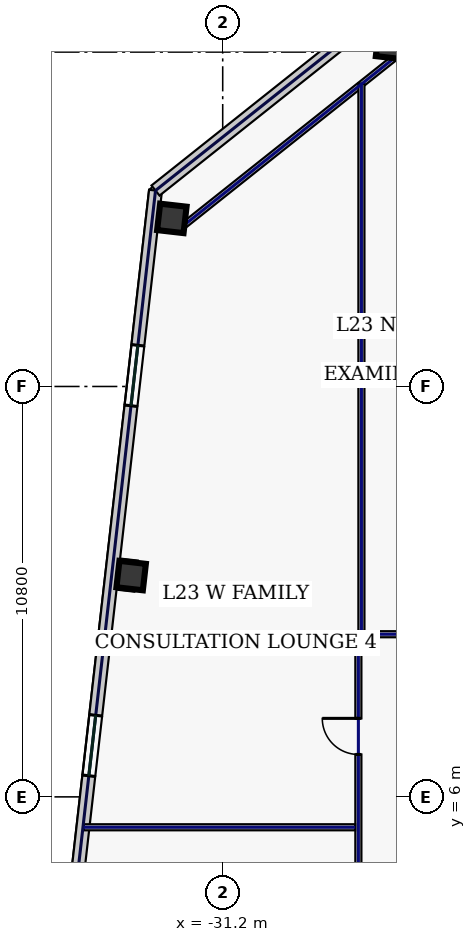
"""IFC4 building model, lengths in metres.
Left out: names, types, materials, properties, quantities, classifications, styles, units other than length and angle.
Written with IfcOpenShell. Run it as: python <this file> out.ifc"""

import sys

from ifc_helpers import new_model, si_unit, direction, frame, frame_2d, origin, origin_2d, place, context, subcontext, project, spatial, rectangle, hollow_rectangle, extrude, element, fill, save


model = new_model("IFC4")
c1 = context("Model", 3, precision=1e-05, world=origin(), true_north=direction((0.0, 1.0)))
c2 = subcontext(c1, "Body", "Model", "MODEL_VIEW")
j1 = project(units=[si_unit("LENGTHUNIT", "METRE"), si_unit("PLANEANGLEUNIT", "RADIAN")], contexts=[c1])
p1 = place(None, origin())
s1 = spatial("IfcSite", under=j1, at=p1, CompositionType="ELEMENT")
p2 = place(p1, origin())
s2 = spatial("IfcBuilding", under=s1, at=p2, CompositionType="ELEMENT")
p3 = place(p2, frame((0.0, 0.0, 105.4)))
s3 = spatial("IfcBuildingStorey", under=s2, at=p3, CompositionType="ELEMENT", Elevation=105.4)
for number, where, z_axis, x_axis in (
    (1, (-26.783, 25.801, 0.0), (0.0, 0.0, 1.0), (0.994, -0.113, 0.0)),
    (2, (-32.538, 21.223, 0.0), (0.0, 0.0, 1.0), (0.994, -0.113, 0.0)),
    (3, (-33.609, 11.824, 0.0), (0.0, 0.0, 1.0), (0.994, -0.113, 0.0)),
):
    element("IfcColumn", number, at=place(p3, frame(where, z_axis=z_axis, x_axis=x_axis)), inside=s3, PredefinedType="COLUMN", context=c2, shape_type="SweptSolid", body=[
        extrude(hollow_rectangle(XDim=0.7, YDim=0.7, WallThickness=0.032, at=origin_2d()), origin(), (0.0, 0.0, 1.0), 3.74),
    ])
p4 = place(p3, frame((-6.314, 23.982, 0.0), z_axis=(0.0, 0.0, 1.0), x_axis=(-0.993571362037, 0.113207546299, 0.0)))
e4 = element("IfcWall", 4, at=p4, inside=s3, PredefinedType="STANDARD", context=c2, shape_type="SweptSolid", body=[
    extrude(rectangle(XDim=21.223, YDim=0.34, at=frame_2d((10.611, 0.0))), origin(), (0.0, 0.0, 1.0), 3.74),
])
p5 = place(p4, frame((17.265, 0.0, 0.22)))
e5 = element("IfcOpeningElement", 5, at=p5, cuts=e4, PredefinedType="OPENING", context=c2, shape_type="SweptSolid", body=[
    extrude(rectangle(XDim=1.6, YDim=1.2, at=frame_2d((0.8, 0.6))), frame((0.0, 0.18, 0.0), z_axis=(0.0, -1.0, 0.0), x_axis=(1.0, 0.0, 0.0)), (0.0, 0.0, 1.0), 0.36),
])
p6 = place(p4, frame((12.794, 0.0, 0.67)))
e6 = element("IfcOpeningElement", 6, at=p6, cuts=e4, PredefinedType="OPENING", context=c2, shape_type="SweptSolid", body=[
    extrude(rectangle(XDim=2.1, YDim=2.2, at=frame_2d((1.05, 1.1))), frame((0.0, 0.18, 0.0), z_axis=(0.0, -1.0, 0.0), x_axis=(1.0, 0.0, 0.0)), (0.0, 0.0, 1.0), 0.36),
])
p7 = place(p4, frame((3.616, 0.0, 0.67)))
e7 = element("IfcOpeningElement", 7, at=p7, cuts=e4, PredefinedType="OPENING", context=c2, shape_type="SweptSolid", body=[
    extrude(rectangle(XDim=2.1, YDim=2.2, at=frame_2d((1.05, 1.1))), frame((0.0, 0.18, 0.0), z_axis=(0.0, -1.0, 0.0), x_axis=(1.0, 0.0, 0.0)), (0.0, 0.0, 1.0), 0.36),
])
p8 = place(p3, frame((-32.968, 21.957, 0.0), z_axis=(0.0, 0.0, 1.0), x_axis=(-0.113201605824, -0.993572038877, 0.0)))
e8 = element("IfcWall", 8, at=p8, inside=s3, PredefinedType="STANDARD", context=c2, shape_type="SweptSolid", body=[
    extrude(rectangle(XDim=39.2, YDim=0.34, at=frame_2d((19.6, 0.0))), origin(), (0.0, 0.0, 1.0), 3.74),
])
p9 = place(p8, frame((4.1, 0.0, 0.58)))
e9 = element("IfcOpeningElement", 9, at=p9, cuts=e8, PredefinedType="OPENING", context=c2, shape_type="SweptSolid", body=[
    extrude(rectangle(XDim=1.6, YDim=2.3, at=frame_2d((0.8, 1.15))), frame((0.0, 0.18, 0.0), z_axis=(0.0, -1.0, 0.0), x_axis=(1.0, 0.0, 0.0)), (0.0, 0.0, 1.0), 0.36),
])
p10 = place(p8, frame((13.9, 0.0, 0.58)))
e10 = element("IfcOpeningElement", 10, at=p10, cuts=e8, PredefinedType="OPENING", context=c2, shape_type="SweptSolid", body=[
    extrude(rectangle(XDim=1.6, YDim=2.3, at=frame_2d((0.8, 1.15))), frame((0.0, 0.18, 0.0), z_axis=(0.0, -1.0, 0.0), x_axis=(1.0, 0.0, 0.0)), (0.0, 0.0, 1.0), 0.36),
])
p11 = place(p8, frame((24.8, 0.0, 0.75)))
e11 = element("IfcOpeningElement", 11, at=p11, cuts=e8, PredefinedType="OPENING", context=c2, shape_type="SweptSolid", body=[
    extrude(rectangle(XDim=0.85, YDim=1.85, at=frame_2d((0.425, 0.925))), frame((0.0, 0.18, 0.0), z_axis=(0.0, -1.0, 0.0), x_axis=(1.0, 0.0, 0.0)), (0.0, 0.0, 1.0), 0.36),
])
p12 = place(p8, frame((33.5, 0.0, 0.58)))
e12 = element("IfcOpeningElement", 12, at=p12, cuts=e8, PredefinedType="OPENING", context=c2, shape_type="SweptSolid", body=[
    extrude(rectangle(XDim=1.6, YDim=2.3, at=frame_2d((0.8, 1.15))), frame((0.0, 0.18, 0.0), z_axis=(0.0, -1.0, 0.0), x_axis=(1.0, 0.0, 0.0)), (0.0, 0.0, 1.0), 0.36),
])
p13 = place(p3, frame((-27.401, 26.385, 0.0), z_axis=(0.0, 0.0, 1.0), x_axis=(-0.78261359446, -0.622507800567, 0.0)))
e13 = element("IfcWall", 13, at=p13, inside=s3, PredefinedType="STANDARD", context=c2, shape_type="SweptSolid", body=[
    extrude(rectangle(XDim=7.114, YDim=0.34, at=frame_2d((3.557, 0.0))), origin(), (0.0, 0.0, 1.0), 3.74),
])
p14 = place(p3, frame((-26.571, 25.535, 0.0), z_axis=(0.0, 0.0, 1.0), x_axis=(-0.782617962887, -0.622502308564, 0.0)))
e14 = element("IfcWall", 14, at=p14, inside=s3, PredefinedType="PARTITIONING", context=c2, shape_type="SweptSolid", body=[
    extrude(rectangle(XDim=7.354, YDim=0.16, at=frame_2d((3.677, 0.0))), origin(), (0.0, 0.0, 1.0), 3.74),
])
p15 = place(p3, frame((-27.63, -10.015, 0.0), z_axis=(0.0, 0.0, 1.0), x_axis=(0.0, 1.0, 0.0)))
e15 = element("IfcWall", 15, at=p15, inside=s3, PredefinedType="PARTITIONING", context=c2, shape_type="SweptSolid", body=[
    extrude(rectangle(XDim=20.13, YDim=0.16, at=frame_2d((10.065, 0.0))), origin(), (0.0, 0.0, 1.0), 3.74),
])
p16 = place(p15, frame((2.169, 0.0, 0.0)))
e16 = element("IfcOpeningElement", 16, at=p16, cuts=e15, PredefinedType="OPENING", context=c2, shape_type="SweptSolid", body=[
    extrude(rectangle(XDim=0.95, YDim=2.2, at=frame_2d((0.475, 1.1))), frame((0.0, 0.09, 0.0), z_axis=(0.0, -1.0, 0.0), x_axis=(1.0, 0.0, 0.0)), (0.0, 0.0, 1.0), 0.18),
])
p17 = place(p15, frame((6.4, 0.0, 0.0)))
e17 = element("IfcOpeningElement", 17, at=p17, cuts=e15, PredefinedType="OPENING", context=c2, shape_type="SweptSolid", body=[
    extrude(rectangle(XDim=0.95, YDim=2.2, at=frame_2d((0.475, 1.1))), frame((0.0, 0.09, 0.0), z_axis=(0.0, -1.0, 0.0), x_axis=(1.0, 0.0, 0.0)), (0.0, 0.0, 1.0), 0.18),
])
p18 = place(p15, frame((11.9, 0.0, 0.0)))
e18 = element("IfcOpeningElement", 18, at=p18, cuts=e15, PredefinedType="OPENING", context=c2, shape_type="SweptSolid", body=[
    extrude(rectangle(XDim=0.95, YDim=2.2, at=frame_2d((0.475, 1.1))), frame((0.0, 0.09, 0.0), z_axis=(0.0, -1.0, 0.0), x_axis=(1.0, 0.0, 0.0)), (0.0, 0.0, 1.0), 0.18),
])
p19 = place(p15, frame((17.131, 0.0, 0.0)))
e19 = element("IfcOpeningElement", 19, at=p19, cuts=e15, PredefinedType="OPENING", context=c2, shape_type="SweptSolid", body=[
    extrude(rectangle(XDim=0.95, YDim=2.2, at=frame_2d((0.475, 1.1))), frame((0.0, 0.09, 0.0), z_axis=(0.0, -1.0, 0.0), x_axis=(1.0, 0.0, 0.0)), (0.0, 0.0, 1.0), 0.18),
])
p20 = place(p3, frame((-27.465, 10.28, 0.0), z_axis=(0.0, 0.0, 1.0), x_axis=(1.0, 0.0, 0.0)))
e20 = element("IfcWall", 20, at=p20, inside=s3, PredefinedType="PARTITIONING", context=c2, shape_type="SweptSolid", body=[
    extrude(rectangle(XDim=54.93, YDim=0.16, at=frame_2d((27.465, 0.0))), origin(), (0.0, 0.0, 1.0), 3.74),
])
p21 = place(p20, frame((2.044, 0.0, 0.0)))
e21 = element("IfcOpeningElement", 21, at=p21, cuts=e20, PredefinedType="OPENING", context=c2, shape_type="SweptSolid", body=[
    extrude(rectangle(XDim=0.95, YDim=2.2, at=frame_2d((0.475, 1.1))), frame((0.0, 0.09, 0.0), z_axis=(0.0, -1.0, 0.0), x_axis=(1.0, 0.0, 0.0)), (0.0, 0.0, 1.0), 0.18),
])
p22 = place(p20, frame((8.045, 0.0, 0.0)))
e22 = element("IfcOpeningElement", 22, at=p22, cuts=e20, PredefinedType="OPENING", context=c2, shape_type="SweptSolid", body=[
    extrude(rectangle(XDim=1.05, YDim=2.2, at=frame_2d((0.525, 1.1))), frame((0.0, 0.09, 0.0), z_axis=(0.0, -1.0, 0.0), x_axis=(1.0, 0.0, 0.0)), (0.0, 0.0, 1.0), 0.18),
])
p23 = place(p20, frame((16.995, 0.0, 0.0)))
e23 = element("IfcOpeningElement", 23, at=p23, cuts=e20, PredefinedType="OPENING", context=c2, shape_type="SweptSolid", body=[
    extrude(rectangle(XDim=0.95, YDim=2.2, at=frame_2d((0.475, 1.1))), frame((0.0, 0.09, 0.0), z_axis=(0.0, -1.0, 0.0), x_axis=(1.0, 0.0, 0.0)), (0.0, 0.0, 1.0), 0.18),
])
p24 = place(p20, frame((27.6, 0.0, 0.0)))
e24 = element("IfcOpeningElement", 24, at=p24, cuts=e20, PredefinedType="OPENING", context=c2, shape_type="SweptSolid", body=[
    extrude(rectangle(XDim=1.3, YDim=2.2, at=frame_2d((0.65, 1.1))), frame((0.0, 0.09, 0.0), z_axis=(0.0, -1.0, 0.0), x_axis=(1.0, 0.0, 0.0)), (0.0, 0.0, 1.0), 0.18),
])
p25 = place(p20, frame((38.575, 0.0, 0.0)))
e25 = element("IfcOpeningElement", 25, at=p25, cuts=e20, PredefinedType="OPENING", context=c2, shape_type="SweptSolid", body=[
    extrude(rectangle(XDim=0.95, YDim=2.2, at=frame_2d((0.475, 1.1))), frame((0.0, 0.09, 0.0), z_axis=(0.0, -1.0, 0.0), x_axis=(1.0, 0.0, 0.0)), (0.0, 0.0, 1.0), 0.18),
])
p26 = place(p20, frame((46.825, 0.0, 0.0)))
e26 = element("IfcOpeningElement", 26, at=p26, cuts=e20, PredefinedType="OPENING", context=c2, shape_type="SweptSolid", body=[
    extrude(rectangle(XDim=0.95, YDim=2.2, at=frame_2d((0.475, 1.1))), frame((0.0, 0.09, 0.0), z_axis=(0.0, -1.0, 0.0), x_axis=(1.0, 0.0, 0.0)), (0.0, 0.0, 1.0), 0.18),
])
p27 = place(p20, frame((51.931, 0.0, 0.0)))
e27 = element("IfcOpeningElement", 27, at=p27, cuts=e20, PredefinedType="OPENING", context=c2, shape_type="SweptSolid", body=[
    extrude(rectangle(XDim=1.3, YDim=2.2, at=frame_2d((0.65, 1.1))), frame((0.0, 0.09, 0.0), z_axis=(0.0, -1.0, 0.0), x_axis=(1.0, 0.0, 0.0)), (0.0, 0.0, 1.0), 0.18),
])
p28 = place(p3, frame((-27.55, 10.365, 0.0), z_axis=(0.0, 0.0, 1.0), x_axis=(0.0, 1.0, 0.0)))
e28 = element("IfcWall", 28, at=p28, inside=s3, PredefinedType="PARTITIONING", context=c2, shape_type="SweptSolid", body=[
    extrude(rectangle(XDim=14.409, YDim=0.16, at=frame_2d((7.204, 0.0))), origin(), (0.0, 0.0, 1.0), 3.74),
])
p29 = place(p3, frame((-34.857, 5.2, 0.0), z_axis=(0.0, 0.0, 1.0), x_axis=(1.0, 0.0, 0.0)))
e29 = element("IfcWall", 29, at=p29, inside=s3, PredefinedType="PARTITIONING", context=c2, shape_type="SweptSolid", body=[
    extrude(rectangle(XDim=7.142, YDim=0.16, at=frame_2d((3.571, 0.0))), origin(), (0.0, 0.0, 1.0), 3.74),
])
p30 = place(p9, origin())
e30 = element("IfcWindow", 30, at=p30, inside=s3, PartitioningType="SINGLE_PANEL", PredefinedType="WINDOW", context=c2, shape_type="SweptSolid", body=[
    extrude(rectangle(XDim=1.6, YDim=2.3, at=frame_2d((0.8, 1.15))), frame((0.0, 0.03, 0.0), z_axis=(0.0, -1.0, 0.0), x_axis=(1.0, 0.0, 0.0)), (0.0, 0.0, 1.0), 0.06),
])
fill(e9, e30)
p31 = place(p10, origin())
e31 = element("IfcWindow", 31, at=p31, inside=s3, PartitioningType="SINGLE_PANEL", PredefinedType="WINDOW", context=c2, shape_type="SweptSolid", body=[
    extrude(rectangle(XDim=1.6, YDim=2.3, at=frame_2d((0.8, 1.15))), frame((0.0, 0.03, 0.0), z_axis=(0.0, -1.0, 0.0), x_axis=(1.0, 0.0, 0.0)), (0.0, 0.0, 1.0), 0.06),
])
fill(e10, e31)
p32 = place(p19, origin())
e32 = element("IfcDoor", 32, at=p32, inside=s3, OperationType="SINGLE_SWING_RIGHT", PredefinedType="DOOR", context=c2, shape_type="SweptSolid", body=[
    extrude(rectangle(XDim=0.95, YDim=2.2, at=frame_2d((0.475, 1.1))), frame((0.0, 0.025, 0.0), z_axis=(0.0, -1.0, 0.0), x_axis=(1.0, 0.0, 0.0)), (0.0, 0.0, 1.0), 0.05),
])
fill(e19, e32)
save(model, sys.argv[1])
